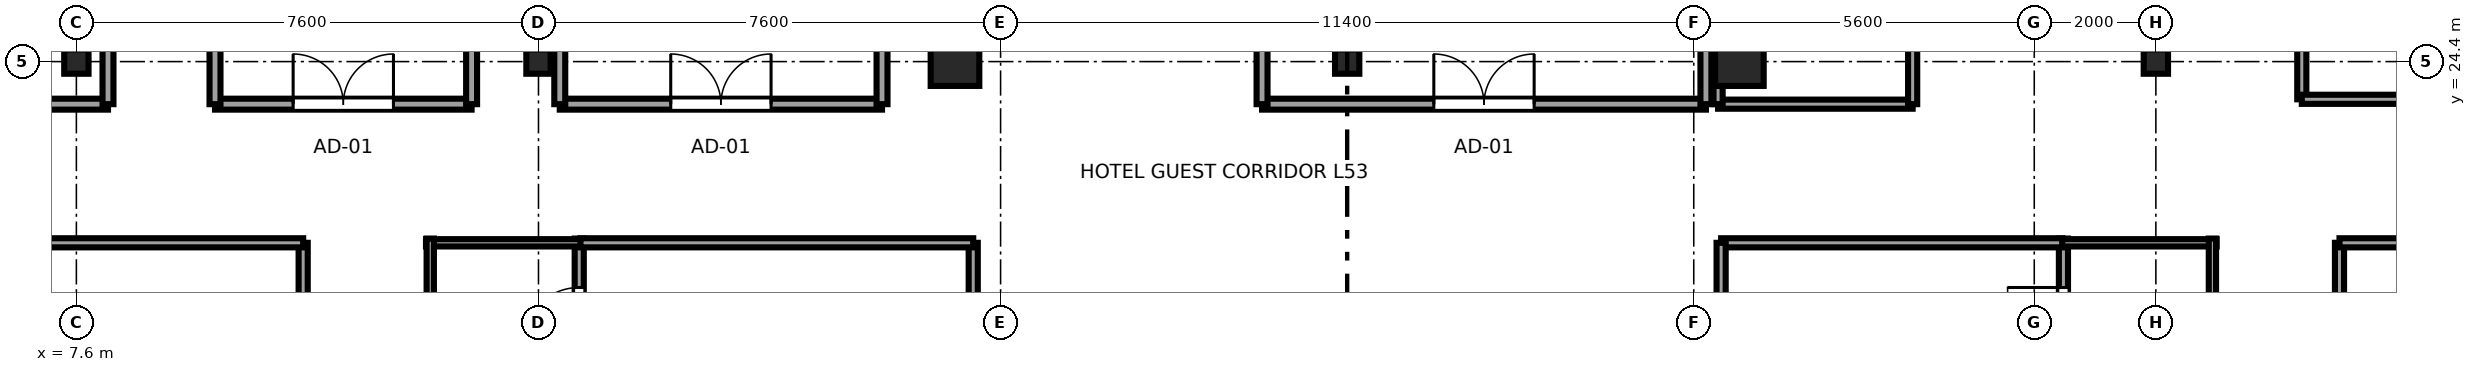
"""IFC4 building model, lengths in metres.
Left out: names, types, materials, properties, quantities, classifications, styles, units other than length and angle.
Written with IfcOpenShell. Run it as: python <this file> out.ifc"""

import sys

from ifc_helpers import new_model, si_unit, direction, frame, frame_2d, origin, origin_2d, place, context, subcontext, project, spatial, rectangle, i_section, extrude, source, transform, mapped, element, fill, save


model = new_model("IFC4")
c1 = context("Model", 3, precision=1e-05, world=origin(), true_north=direction((0.0, 1.0)))
c2 = subcontext(c1, "Body", "Model", "MODEL_VIEW")
j1 = project(units=[si_unit("LENGTHUNIT", "METRE"), si_unit("PLANEANGLEUNIT", "RADIAN")], contexts=[c1])
p1 = place(None, origin())
s1 = spatial("IfcSite", under=j1, at=p1, CompositionType="ELEMENT")
p2 = place(p1, origin())
s2 = spatial("IfcBuilding", under=s1, at=p2, CompositionType="ELEMENT")
p3 = place(p2, frame((0.0, 0.0, 201.75)))
s3 = spatial("IfcBuildingStorey", under=s2, at=p3, CompositionType="ELEMENT", Elevation=201.75)
m1 = source(origin(), c2, "Body", "SweptSolid", [
    extrude(i_section(OverallWidth=0.4, OverallDepth=0.4, WebThickness=0.02, FlangeThickness=0.035, at=origin_2d()), origin(), (0.0, 0.0, 1.0), 3.55),
])
for number, where, z_axis, x_axis in (
    (1, (7.6, 24.4, 0.0), (0.0, 0.0, 1.0), (1.0, 0.0, 0.0)),
    (2, (15.2, 24.4, 0.0), (0.0, 0.0, 1.0), (1.0, 0.0, 0.0)),
):
    element("IfcColumn", number, at=place(p3, frame(where, z_axis=z_axis, x_axis=x_axis)), inside=s3, PredefinedType="COLUMN", context=c2, shape_type="MappedRepresentation", body=[
        mapped(m1, transform((0.0, 0.0, 0.0), x_axis=(1.0, 0.0, 0.0), y_axis=(0.0, 1.0, 0.0), z_axis=(0.0, 0.0, 1.0), scale=1.0)),
    ])
m2 = source(origin(), c2, "Body", "SweptSolid", [
    extrude(rectangle(XDim=0.8, YDim=0.8, at=origin_2d()), origin(), (0.0, 0.0, 1.0), 3.55),
])
for number, where, z_axis, x_axis in (
    (3, (22.05, 24.4, 0.0), (0.0, 0.0, 1.0), (1.0, 0.0, 0.0)),
    (4, (34.95, 24.4, 0.0), (0.0, 0.0, 1.0), (1.0, 0.0, 0.0)),
):
    element("IfcColumn", number, at=place(p3, frame(where, z_axis=z_axis, x_axis=x_axis)), inside=s3, PredefinedType="COLUMN", context=c2, shape_type="MappedRepresentation", body=[
        mapped(m2, transform((0.0, 0.0, 0.0), x_axis=(1.0, 0.0, 0.0), y_axis=(0.0, 1.0, 0.0), z_axis=(0.0, 0.0, 1.0), scale=1.0)),
    ])
for number, where, z_axis, x_axis in (
    (5, (41.8, 24.4, 0.0), (0.0, 0.0, 1.0), (1.0, 0.0, 0.0)),
    (6, (28.5, 24.4, 0.0), (0.0, 0.0, 1.0), (1.0, 0.0, 0.0)),
):
    element("IfcColumn", number, at=place(p3, frame(where, z_axis=z_axis, x_axis=x_axis)), inside=s3, PredefinedType="COLUMN", context=c2, shape_type="MappedRepresentation", body=[
        mapped(m1, transform((0.0, 0.0, 0.0), x_axis=(1.0, 0.0, 0.0), y_axis=(0.0, 1.0, 0.0), z_axis=(0.0, 0.0, 1.0), scale=1.0)),
    ])
p4 = place(p3, frame((15.87, 19.1, 0.0), z_axis=(0.0, 0.0, 1.0), x_axis=(0.0, 1.0, 0.0)))
e7 = element("IfcWall", 7, at=p4, inside=s3, PredefinedType="PARTITIONING", context=c2, shape_type="SweptSolid", body=[
    extrude(rectangle(XDim=2.39, YDim=0.15, at=frame_2d((1.195, 0.0))), origin(), (0.0, 0.0, 1.0), 3.29),
])
p5 = place(p4, frame((0.665, 0.0, 0.0)))
e8 = element("IfcOpeningElement", 8, at=p5, cuts=e7, PredefinedType="OPENING", context=c2, shape_type="SweptSolid", body=[
    extrude(rectangle(XDim=0.92, YDim=2.01, at=frame_2d((0.46, 1.005))), frame((0.0, 0.085, 0.0), z_axis=(0.0, -1.0, 0.0), x_axis=(1.0, 0.0, 0.0)), (0.0, 0.0, 1.0), 0.17),
])
p6 = place(p3, frame((13.35, 21.42, 0.0), z_axis=(0.0, 0.0, 1.0), x_axis=(1.0, 0.0, 0.0)))
e9 = element("IfcWall", 9, at=p6, inside=s3, PredefinedType="PLUMBINGWALL", context=c2, shape_type="SweptSolid", body=[
    extrude(rectangle(XDim=2.59, YDim=0.12, at=frame_2d((1.295, 0.0))), origin(), (0.0, 0.0, 1.0), 3.29),
])
p7 = place(p3, frame((13.42, 19.1, 0.0), z_axis=(0.0, 0.0, 1.0), x_axis=(0.0, 1.0, 0.0)))
e10 = element("IfcWall", 10, at=p7, inside=s3, PredefinedType="PLUMBINGWALL", context=c2, shape_type="SweptSolid", body=[
    extrude(rectangle(XDim=2.39, YDim=0.12, at=frame_2d((1.195, 0.0))), origin(), (0.0, 0.0, 1.0), 3.29),
])
p8 = place(p3, frame((40.28, 19.1, 0.0), z_axis=(0.0, 0.0, 1.0), x_axis=(0.0, 1.0, 0.0)))
e11 = element("IfcWall", 11, at=p8, inside=s3, PredefinedType="PARTITIONING", context=c2, shape_type="SweptSolid", body=[
    extrude(rectangle(XDim=2.39, YDim=0.15, at=frame_2d((1.195, 0.0))), origin(), (0.0, 0.0, 1.0), 3.29),
])
p9 = place(p8, frame((0.665, 0.0, 0.0)))
e12 = element("IfcOpeningElement", 12, at=p9, cuts=e11, PredefinedType="OPENING", context=c2, shape_type="SweptSolid", body=[
    extrude(rectangle(XDim=0.92, YDim=2.01, at=frame_2d((0.46, 1.005))), frame((0.0, 0.085, 0.0), z_axis=(0.0, -1.0, 0.0), x_axis=(1.0, 0.0, 0.0)), (0.0, 0.0, 1.0), 0.17),
])
p10 = place(p3, frame((40.21, 21.42, 0.0), z_axis=(0.0, 0.0, 1.0), x_axis=(1.0, 0.0, 0.0)))
e13 = element("IfcWall", 13, at=p10, inside=s3, PredefinedType="PLUMBINGWALL", context=c2, shape_type="SweptSolid", body=[
    extrude(rectangle(XDim=2.59, YDim=0.12, at=frame_2d((1.295, 0.0))), origin(), (0.0, 0.0, 1.0), 3.29),
])
p11 = place(p3, frame((42.73, 19.1, 0.0), z_axis=(0.0, 0.0, 1.0), x_axis=(0.0, 1.0, 0.0)))
e14 = element("IfcWall", 14, at=p11, inside=s3, PredefinedType="PLUMBINGWALL", context=c2, shape_type="SweptSolid", body=[
    extrude(rectangle(XDim=2.39, YDim=0.12, at=frame_2d((1.195, 0.0))), origin(), (0.0, 0.0, 1.0), 3.29),
])
p12 = place(p3, frame((11.33, 14.61, 0.0), z_axis=(0.0, 0.0, 1.0), x_axis=(0.0, 1.0, 0.0)))
e15 = element("IfcWall", 15, at=p12, inside=s3, PredefinedType="PARTITIONING", context=c2, shape_type="SweptSolid", body=[
    extrude(rectangle(XDim=6.81, YDim=0.15, at=frame_2d((3.405, 0.0))), origin(), (0.0, 0.0, 1.0), 2.921),
])
p13 = place(p12, frame((2.895, 0.0, 0.0)))
e16 = element("IfcOpeningElement", 16, at=p13, cuts=e15, PredefinedType="OPENING", context=c2, shape_type="SweptSolid", body=[
    extrude(rectangle(XDim=0.98, YDim=2.12, at=frame_2d((0.49, 1.06))), frame((0.0, 0.085, 0.0), z_axis=(0.0, -1.0, 0.0), x_axis=(1.0, 0.0, 0.0)), (0.0, 0.0, 1.0), 0.17),
])
p14 = place(p3, frame((3.005, 21.42, 0.0), z_axis=(0.0, 0.0, 1.0), x_axis=(1.0, 0.0, 0.0)))
e17 = element("IfcWall", 17, at=p14, inside=s3, PredefinedType="PARTITIONING", context=c2, shape_type="SweptSolid", body=[
    extrude(rectangle(XDim=8.325, YDim=0.15, at=frame_2d((4.163, 0.0))), origin(), (0.0, 0.0, 1.0), 3.29),
])
p15 = place(p3, frame((22.35, 15.48, 0.0), z_axis=(0.0, 0.0, 1.0), x_axis=(0.0, 1.0, 0.0)))
e18 = element("IfcWall", 18, at=p15, inside=s3, PredefinedType="PARTITIONING", context=c2, shape_type="SweptSolid", body=[
    extrude(rectangle(XDim=5.94, YDim=0.15, at=frame_2d((2.97, 0.0))), origin(), (0.0, 0.0, 1.0), 2.08),
])
p16 = place(p3, frame((15.89, 21.42, 0.0), z_axis=(0.0, 0.0, 1.0), x_axis=(1.0, 0.0, 0.0)))
e19 = element("IfcWall", 19, at=p16, inside=s3, PredefinedType="PARTITIONING", context=c2, shape_type="SweptSolid", body=[
    extrude(rectangle(XDim=6.46, YDim=0.15, at=frame_2d((3.23, 0.0))), origin(), (0.0, 0.0, 1.0), 3.29),
])
p17 = place(p3, frame((34.65, 21.42, 0.0), z_axis=(0.0, 0.0, 1.0), x_axis=(1.0, 0.0, 0.0)))
e20 = element("IfcWall", 20, at=p17, inside=s3, PredefinedType="PARTITIONING", context=c2, shape_type="SweptSolid", body=[
    extrude(rectangle(XDim=5.61, YDim=0.15, at=frame_2d((2.805, 0.0))), origin(), (0.0, 0.0, 1.0), 3.29),
])
p18 = place(p3, frame((34.65, 15.28, 0.0), z_axis=(0.0, 0.0, 1.0), x_axis=(0.0, 1.0, 0.0)))
e21 = element("IfcWall", 21, at=p18, inside=s3, PredefinedType="PARTITIONING", context=c2, shape_type="SweptSolid", body=[
    extrude(rectangle(XDim=6.14, YDim=0.15, at=frame_2d((3.07, 0.0))), origin(), (0.0, 0.0, 1.0), 2.08),
])
p19 = place(p3, frame((44.82, 14.61, 0.0), z_axis=(0.0, 0.0, 1.0), x_axis=(0.0, 1.0, 0.0)))
e22 = element("IfcWall", 22, at=p19, inside=s3, PredefinedType="PARTITIONING", context=c2, shape_type="SweptSolid", body=[
    extrude(rectangle(XDim=6.81, YDim=0.15, at=frame_2d((3.405, 0.0))), origin(), (0.0, 0.0, 1.0), 3.29),
])
p20 = place(p19, frame((2.895, 0.0, 0.0)))
e23 = element("IfcOpeningElement", 23, at=p20, cuts=e22, PredefinedType="OPENING", context=c2, shape_type="SweptSolid", body=[
    extrude(rectangle(XDim=0.98, YDim=2.12, at=frame_2d((0.49, 1.06))), frame((0.0, 0.085, 0.0), z_axis=(0.0, -1.0, 0.0), x_axis=(1.0, 0.0, 0.0)), (0.0, 0.0, 1.0), 0.17),
])
p21 = place(p3, frame((44.82, 21.42, 0.0), z_axis=(0.0, 0.0, 1.0), x_axis=(1.0, 0.0, 0.0)))
e24 = element("IfcWall", 24, at=p21, inside=s3, PredefinedType="PARTITIONING", context=c2, shape_type="SweptSolid", body=[
    extrude(rectangle(XDim=9.175, YDim=0.15, at=frame_2d((4.587, 0.0))), origin(), (0.0, 0.0, 1.0), 3.29),
])
p22 = place(p3, frame((3.005, 23.7, 0.0), z_axis=(0.0, 0.0, 1.0), x_axis=(1.0, 0.0, 0.0)))
e25 = element("IfcWall", 25, at=p22, inside=s3, PredefinedType="PARTITIONING", context=c2, shape_type="SweptSolid", body=[
    extrude(rectangle(XDim=5.115, YDim=0.18, at=frame_2d((2.558, 0.0))), origin(), (0.0, 0.0, 1.0), 3.29),
])
p23 = place(p3, frame((8.12, 23.7, 0.0), z_axis=(0.0, 0.0, 1.0), x_axis=(0.0, 1.0, 0.0)))
e26 = element("IfcWall", 26, at=p23, inside=s3, PredefinedType="PARTITIONING", context=c2, shape_type="SweptSolid", body=[
    extrude(rectangle(XDim=7.5, YDim=0.18, at=frame_2d((3.75, 0.0))), origin(), (0.0, 0.0, 1.0), 3.29),
])
p24 = place(p23, frame((2.925, 0.0, 0.0)))
e27 = element("IfcOpeningElement", 27, at=p24, cuts=e26, PredefinedType="OPENING", context=c2, shape_type="SweptSolid", body=[
    extrude(rectangle(XDim=1.65, YDim=2.15, at=frame_2d((0.825, 1.075))), frame((0.0, 0.1, 0.0), z_axis=(0.0, -1.0, 0.0), x_axis=(1.0, 0.0, 0.0)), (0.0, 0.0, 1.0), 0.2),
])
p25 = place(p3, frame((44.2, 23.78, 0.0), z_axis=(0.0, 0.0, 1.0), x_axis=(0.0, 1.0, 0.0)))
e28 = element("IfcWall", 28, at=p25, inside=s3, PredefinedType="PARTITIONING", context=c2, shape_type="SweptSolid", body=[
    extrude(rectangle(XDim=8.29, YDim=0.15, at=frame_2d((4.145, 0.0))), origin(), (0.0, 0.0, 1.0), 3.29),
])
p26 = place(p25, frame((3.655, 0.0, 0.0)))
e29 = element("IfcOpeningElement", 29, at=p26, cuts=e28, PredefinedType="OPENING", context=c2, shape_type="SweptSolid", body=[
    extrude(rectangle(XDim=0.98, YDim=2.12, at=frame_2d((0.49, 1.06))), frame((0.0, 0.085, 0.0), z_axis=(0.0, -1.0, 0.0), x_axis=(1.0, 0.0, 0.0)), (0.0, 0.0, 1.0), 0.17),
])
p27 = place(p3, frame((44.2, 23.78, 0.0), z_axis=(0.0, 0.0, 1.0), x_axis=(1.0, 0.0, 0.0)))
e30 = element("IfcWall", 30, at=p27, inside=s3, PredefinedType="PARTITIONING", context=c2, shape_type="SweptSolid", body=[
    extrude(rectangle(XDim=9.795, YDim=0.15, at=frame_2d((4.897, 0.0))), origin(), (0.0, 0.0, 1.0), 3.29),
])
p28 = place(p3, frame((9.88, 23.7, 0.0), z_axis=(0.0, 0.0, 1.0), x_axis=(1.0, 0.0, 0.0)))
e31 = element("IfcWall", 31, at=p28, inside=s3, PredefinedType="PARTITIONING", context=c2, shape_type="SweptSolid", body=[
    extrude(rectangle(XDim=4.22, YDim=0.18, at=frame_2d((2.11, 0.0))), origin(), (0.0, 0.0, 1.0), 3.29),
])
p29 = place(p28, frame((1.285, 0.0, 0.0)))
e32 = element("IfcOpeningElement", 32, at=p29, cuts=e31, PredefinedType="OPENING", context=c2, shape_type="SweptSolid", body=[
    extrude(rectangle(XDim=1.65, YDim=2.15, at=frame_2d((0.825, 1.075))), frame((0.0, 0.1, 0.0), z_axis=(0.0, -1.0, 0.0), x_axis=(1.0, 0.0, 0.0)), (0.0, 0.0, 1.0), 0.2),
])
for number, where, z_axis, x_axis in (
    (33, (9.88, 23.7, 0.0), (0.0, 0.0, 1.0), (0.0, 1.0, 0.0)),
    (34, (14.1, 23.7, 0.0), (0.0, 0.0, 1.0), (0.0, 1.0, 0.0)),
):
    element("IfcWall", number, at=place(p3, frame(where, z_axis=z_axis, x_axis=x_axis)), inside=s3, PredefinedType="PARTITIONING", context=c2, shape_type="SweptSolid", body=[
        extrude(rectangle(XDim=6.05, YDim=0.18, at=frame_2d((3.025, 0.0))), origin(), (0.0, 0.0, 1.0), 3.29),
    ])
p30 = place(p3, frame((27.1, 23.7, 0.0), z_axis=(0.0, 0.0, 1.0), x_axis=(1.0, 0.0, 0.0)))
e35 = element("IfcWall", 35, at=p30, inside=s3, PredefinedType="PARTITIONING", context=c2, shape_type="SweptSolid", body=[
    extrude(rectangle(XDim=7.3, YDim=0.18, at=frame_2d((3.65, 0.0))), origin(), (0.0, 0.0, 1.0), 3.29),
])
p31 = place(p30, frame((2.825, 0.0, 0.0)))
e36 = element("IfcOpeningElement", 36, at=p31, cuts=e35, PredefinedType="OPENING", context=c2, shape_type="SweptSolid", body=[
    extrude(rectangle(XDim=1.65, YDim=2.15, at=frame_2d((0.825, 1.075))), frame((0.0, 0.1, 0.0), z_axis=(0.0, -1.0, 0.0), x_axis=(1.0, 0.0, 0.0)), (0.0, 0.0, 1.0), 0.2),
])
for number, where, z_axis, x_axis in (
    (37, (27.1, 23.7, 0.0), (0.0, 0.0, 1.0), (0.0, 1.0, 0.0)),
    (38, (34.4, 23.7, 0.0), (0.0, 0.0, 1.0), (0.0, 1.0, 0.0)),
):
    element("IfcWall", number, at=place(p3, frame(where, z_axis=z_axis, x_axis=x_axis)), inside=s3, PredefinedType="PARTITIONING", context=c2, shape_type="SweptSolid", body=[
        extrude(rectangle(XDim=6.1, YDim=0.18, at=frame_2d((3.05, 0.0))), origin(), (0.0, 0.0, 1.0), 3.29),
    ])
p32 = place(p3, frame((15.55, 23.7, 0.0), z_axis=(0.0, 0.0, 1.0), x_axis=(1.0, 0.0, 0.0)))
e39 = element("IfcWall", 39, at=p32, inside=s3, PredefinedType="PARTITIONING", context=c2, shape_type="SweptSolid", body=[
    extrude(rectangle(XDim=5.3, YDim=0.18, at=frame_2d((2.65, 0.0))), origin(), (0.0, 0.0, 1.0), 3.29),
])
p33 = place(p32, frame((1.825, 0.0, 0.0)))
e40 = element("IfcOpeningElement", 40, at=p33, cuts=e39, PredefinedType="OPENING", context=c2, shape_type="SweptSolid", body=[
    extrude(rectangle(XDim=1.65, YDim=2.15, at=frame_2d((0.825, 1.075))), frame((0.0, 0.1, 0.0), z_axis=(0.0, -1.0, 0.0), x_axis=(1.0, 0.0, 0.0)), (0.0, 0.0, 1.0), 0.2),
])
for number, where, z_axis, x_axis in (
    (41, (15.55, 23.7, 0.0), (0.0, 0.0, 1.0), (0.0, 1.0, 0.0)),
    (42, (20.85, 23.7, 0.0), (0.0, 0.0, 1.0), (0.0, 1.0, 0.0)),
):
    element("IfcWall", number, at=place(p3, frame(where, z_axis=z_axis, x_axis=x_axis)), inside=s3, PredefinedType="PARTITIONING", context=c2, shape_type="SweptSolid", body=[
        extrude(rectangle(XDim=6.1, YDim=0.18, at=frame_2d((3.05, 0.0))), origin(), (0.0, 0.0, 1.0), 3.29),
    ])
p34 = place(p3, frame((34.6, 23.7, 0.0), z_axis=(0.0, 0.0, 1.0), x_axis=(1.0, 0.0, 0.0)))
e43 = element("IfcWall", 43, at=p34, inside=s3, PredefinedType="PARTITIONING", context=c2, shape_type="SweptSolid", body=[
    extrude(rectangle(XDim=3.2, YDim=0.15, at=frame_2d((1.6, 0.0))), origin(), (0.0, 0.0, 1.0), 3.29),
])
for number, where, z_axis, x_axis in (
    (44, (34.6, 23.7, 0.0), (0.0, 0.0, 1.0), (0.0, 1.0, 0.0)),
    (45, (37.8, 23.7, 0.0), (0.0, 0.0, 1.0), (0.0, 1.0, 0.0)),
):
    element("IfcWall", number, at=place(p3, frame(where, z_axis=z_axis, x_axis=x_axis)), inside=s3, PredefinedType="PARTITIONING", context=c2, shape_type="SweptSolid", body=[
        extrude(rectangle(XDim=5.7, YDim=0.15, at=frame_2d((2.85, 0.0))), origin(), (0.0, 0.0, 1.0), 3.29),
    ])
m3 = source(origin(), c2, "Body", "SweptSolid", [
    extrude(rectangle(XDim=0.92, YDim=2.01, at=frame_2d((0.46, 1.005))), frame((0.0, 0.025, 0.0), z_axis=(0.0, -1.0, 0.0), x_axis=(1.0, 0.0, 0.0)), (0.0, 0.0, 1.0), 0.05),
])
p35 = place(p5, origin())
e46 = element("IfcDoor", 46, at=p35, inside=s3, OperationType="SINGLE_SWING_LEFT", PredefinedType="DOOR", context=c2, shape_type="MappedRepresentation", body=[
    mapped(m3, transform((0.0, 0.0, 0.0), x_axis=(1.0, 0.0, 0.0), y_axis=(0.0, 1.0, 0.0), z_axis=(0.0, 0.0, 1.0), scale=1.0)),
])
fill(e8, e46)
p36 = place(p9, origin())
e47 = element("IfcDoor", 47, at=p36, inside=s3, OperationType="SINGLE_SWING_RIGHT", PredefinedType="DOOR", context=c2, shape_type="MappedRepresentation", body=[
    mapped(m3, transform((0.0, 0.0, 0.0), x_axis=(1.0, 0.0, 0.0), y_axis=(0.0, 1.0, 0.0), z_axis=(0.0, 0.0, 1.0), scale=1.0)),
])
fill(e12, e47)
m4 = source(origin(), c2, "Body", "SweptSolid", [
    extrude(rectangle(XDim=1.65, YDim=2.15, at=frame_2d((0.825, 1.075))), frame((0.0, 0.025, 0.0), z_axis=(0.0, -1.0, 0.0), x_axis=(1.0, 0.0, 0.0)), (0.0, 0.0, 1.0), 0.05),
])
p37 = place(p29, origin())
e48 = element("IfcDoor", 48, at=p37, inside=s3, OperationType="DOUBLE_DOOR_SINGLE_SWING", PredefinedType="DOOR", context=c2, shape_type="MappedRepresentation", body=[
    mapped(m4, transform((0.0, 0.0, 0.0), x_axis=(1.0, 0.0, 0.0), y_axis=(0.0, 1.0, 0.0), z_axis=(0.0, 0.0, 1.0), scale=1.0)),
])
fill(e32, e48)
p38 = place(p31, origin())
e49 = element("IfcDoor", 49, at=p38, inside=s3, OperationType="DOUBLE_DOOR_SINGLE_SWING", PredefinedType="DOOR", context=c2, shape_type="MappedRepresentation", body=[
    mapped(m4, transform((0.0, 0.0, 0.0), x_axis=(1.0, 0.0, 0.0), y_axis=(0.0, 1.0, 0.0), z_axis=(0.0, 0.0, 1.0), scale=1.0)),
])
fill(e36, e49)
p39 = place(p33, origin())
e50 = element("IfcDoor", 50, at=p39, inside=s3, OperationType="DOUBLE_DOOR_SINGLE_SWING", PredefinedType="DOOR", context=c2, shape_type="MappedRepresentation", body=[
    mapped(m4, transform((0.0, 0.0, 0.0), x_axis=(1.0, 0.0, 0.0), y_axis=(0.0, 1.0, 0.0), z_axis=(0.0, 0.0, 1.0), scale=1.0)),
])
fill(e40, e50)
save(model, sys.argv[1])
